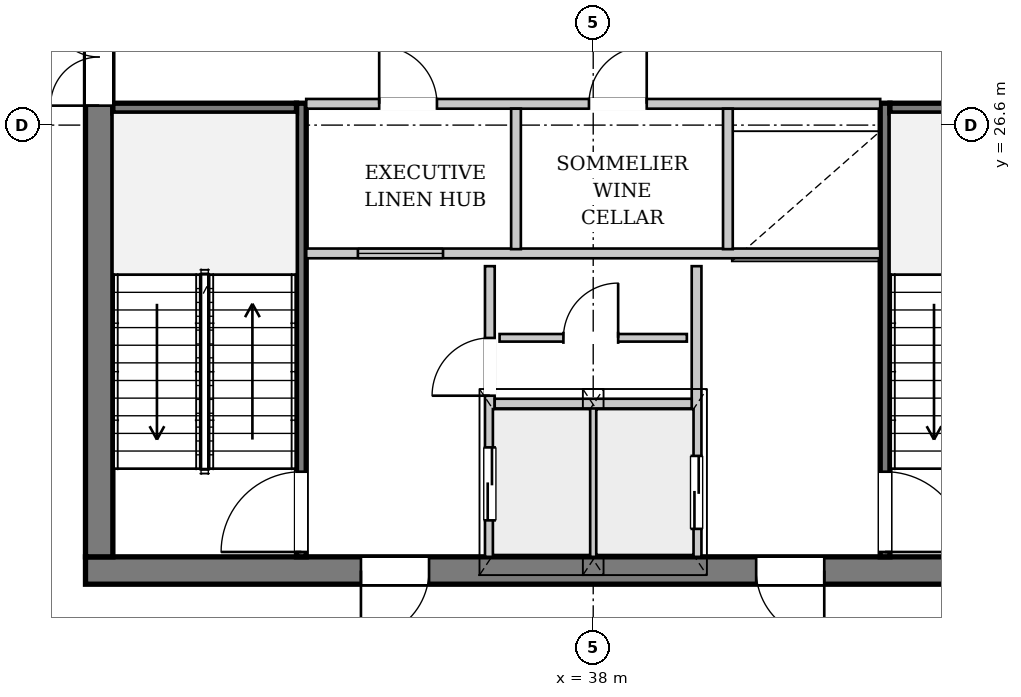
"""IFC4 building model, lengths in metres.
Left out: names, types, materials, properties, quantities, classifications, styles, units other than length and angle.
Written with IfcOpenShell. Run it as: python <this file> out.ifc"""

import sys

from ifc_helpers import new_model, si_unit, direction, frame, frame_2d, origin, place, context, subcontext, project, spatial, rectangle, extrude, source, transform, mapped, element, fill, save


model = new_model("IFC4")
c1 = context("Model", 3, precision=1e-05, world=origin(), true_north=direction((0.0, 1.0)))
c2 = subcontext(c1, "Body", "Model", "MODEL_VIEW")
j1 = project(units=[si_unit("LENGTHUNIT", "METRE"), si_unit("PLANEANGLEUNIT", "RADIAN")], contexts=[c1])
p1 = place(None, origin())
s1 = spatial("IfcSite", under=j1, at=p1, CompositionType="ELEMENT")
p2 = place(p1, origin())
s2 = spatial("IfcBuilding", under=s1, at=p2, CompositionType="ELEMENT")
p3 = place(p2, frame((0.0, 0.0, 277.7)))
s3 = spatial("IfcBuildingStorey", under=s2, at=p3, CompositionType="ELEMENT", Elevation=277.7)
p4 = place(p3, frame((30.073, 13.017, 0.0), z_axis=(0.0, 0.0, 1.0), x_axis=(-0.800180538876, 0.599759206018, 0.0)))
e1 = element("IfcWall", 1, at=p4, inside=s3, PredefinedType="SOLIDWALL", context=c2, shape_type="SweptSolid", body=[
    extrude(rectangle(XDim=17.198, YDim=0.32, at=frame_2d((8.599, 0.0))), origin(), (0.0, 0.0, 1.0), 3.462),
])
p5 = place(p4, frame((4.753, 0.0, 0.0)))
e2 = element("IfcOpeningElement", 2, at=p5, cuts=e1, PredefinedType="OPENING", context=c2, shape_type="SweptSolid", body=[
    extrude(rectangle(XDim=1.5, YDim=2.3, at=frame_2d((0.75, 1.15))), frame((0.0, 0.17, 0.0), z_axis=(0.0, -1.0, 0.0), x_axis=(1.0, 0.0, 0.0)), (0.0, 0.0, 1.0), 0.34),
])
p6 = place(p4, frame((11.426, 0.0, 0.65)))
e3 = element("IfcOpeningElement", 3, at=p6, cuts=e1, PredefinedType="OPENING", context=c2, shape_type="SweptSolid", body=[
    extrude(rectangle(XDim=2.6, YDim=2.35, at=frame_2d((1.3, 1.175))), frame((0.0, 0.17, 0.0), z_axis=(0.0, -1.0, 0.0), x_axis=(1.0, 0.0, 0.0)), (0.0, 0.0, 1.0), 0.34),
])
p7 = place(p3, frame((46.35, 19.275, 0.0), z_axis=(0.0, 0.0, 1.0), x_axis=(-1.0, 0.0, 0.0)))
e4 = element("IfcWall", 4, at=p7, inside=s3, PredefinedType="SHEAR", context=c2, shape_type="SweptSolid", body=[
    extrude(rectangle(XDim=16.7, YDim=0.45, at=frame_2d((8.35, 0.0))), origin(), (0.0, 0.0, 1.0), 3.92),
])
p8 = place(p7, frame((4.55, 0.0, 0.0)))
e5 = element("IfcOpeningElement", 5, at=p8, cuts=e4, PredefinedType="OPENING", context=c2, shape_type="SweptSolid", body=[
    extrude(rectangle(XDim=1.12, YDim=2.25, at=frame_2d((0.56, 1.125))), frame((0.0, 0.235, 0.0), z_axis=(0.0, -1.0, 0.0), x_axis=(1.0, 0.0, 0.0)), (0.0, 0.0, 1.0), 0.47),
])
p9 = place(p7, frame((11.05, 0.0, 0.0)))
e6 = element("IfcOpeningElement", 6, at=p9, cuts=e4, PredefinedType="OPENING", context=c2, shape_type="SweptSolid", body=[
    extrude(rectangle(XDim=1.12, YDim=2.25, at=frame_2d((0.56, 1.125))), frame((0.0, 0.235, 0.0), z_axis=(0.0, -1.0, 0.0), x_axis=(1.0, 0.0, 0.0)), (0.0, 0.0, 1.0), 0.47),
])
p10 = place(p3, frame((29.875, 19.5, 0.0), z_axis=(0.0, 0.0, 1.0), x_axis=(0.0, 1.0, 0.0)))
e7 = element("IfcWall", 7, at=p10, inside=s3, PredefinedType="SHEAR", context=c2, shape_type="SweptSolid", body=[
    extrude(rectangle(XDim=14.2, YDim=0.45, at=frame_2d((7.1, 0.0))), origin(), (0.0, 0.0, 1.0), 3.92),
])
p11 = place(p10, frame((7.42, 0.0, 0.0)))
e8 = element("IfcOpeningElement", 8, at=p11, cuts=e7, PredefinedType="OPENING", context=c2, shape_type="SweptSolid", body=[
    extrude(rectangle(XDim=1.6, YDim=2.2, at=frame_2d((0.8, 1.1))), frame((0.0, 0.235, 0.0), z_axis=(0.0, -1.0, 0.0), x_axis=(1.0, 0.0, 0.0)), (0.0, 0.0, 1.0), 0.47),
])
p12 = place(p3, frame((33.2, 19.5, 0.0), z_axis=(0.0, 0.0, 1.0), x_axis=(0.0, 1.0, 0.0)))
e9 = element("IfcWall", 9, at=p12, inside=s3, PredefinedType="PARTITIONING", context=c2, shape_type="SweptSolid", body=[
    extrude(rectangle(XDim=7.46, YDim=0.16, at=frame_2d((3.73, 0.0))), origin(), (0.0, 0.0, 1.0), 3.92),
])
p13 = place(p12, frame((0.08, 0.0, 0.0)))
e10 = element("IfcOpeningElement", 10, at=p13, cuts=e9, PredefinedType="OPENING", context=c2, shape_type="SweptSolid", body=[
    extrude(rectangle(XDim=1.32, YDim=2.2, at=frame_2d((0.66, 1.1))), frame((0.0, 0.09, 0.0), z_axis=(0.0, -1.0, 0.0), x_axis=(1.0, 0.0, 0.0)), (0.0, 0.0, 1.0), 0.18),
])
p14 = place(p3, frame((30.1, 26.88, 0.0), z_axis=(0.0, 0.0, 1.0), x_axis=(1.0, 0.0, 0.0)))
e11 = element("IfcWall", 11, at=p14, inside=s3, PredefinedType="PARTITIONING", context=c2, shape_type="SweptSolid", body=[
    extrude(rectangle(XDim=3.02, YDim=0.16, at=frame_2d((1.51, 0.0))), origin(), (0.0, 0.0, 1.0), 3.92),
])
p15 = place(p3, frame((42.8, 26.96, 0.0), z_axis=(0.0, 0.0, 1.0), x_axis=(0.0, -1.0, 0.0)))
e12 = element("IfcWall", 12, at=p15, inside=s3, PredefinedType="PARTITIONING", context=c2, shape_type="SweptSolid", body=[
    extrude(rectangle(XDim=7.46, YDim=0.16, at=frame_2d((3.73, 0.0))), origin(), (0.0, 0.0, 1.0), 3.92),
])
p16 = place(p15, frame((6.06, 0.0, 0.0)))
e13 = element("IfcOpeningElement", 13, at=p16, cuts=e12, PredefinedType="OPENING", context=c2, shape_type="SweptSolid", body=[
    extrude(rectangle(XDim=1.32, YDim=2.2, at=frame_2d((0.66, 1.1))), frame((0.0, 0.09, 0.0), z_axis=(0.0, -1.0, 0.0), x_axis=(1.0, 0.0, 0.0)), (0.0, 0.0, 1.0), 0.18),
])
p17 = place(p3, frame((42.88, 26.88, 0.0), z_axis=(0.0, 0.0, 1.0), x_axis=(1.0, 0.0, 0.0)))
e14 = element("IfcWall", 14, at=p17, inside=s3, PredefinedType="PARTITIONING", context=c2, shape_type="SweptSolid", body=[
    extrude(rectangle(XDim=3.02, YDim=0.16, at=frame_2d((1.51, 0.0))), origin(), (0.0, 0.0, 1.0), 3.92),
])
p18 = place(p3, frame((36.3, 19.5, 0.0), z_axis=(0.0, 0.0, 1.0), x_axis=(0.0, 1.0, 0.0)))
e15 = element("IfcWall", 15, at=p18, inside=s3, PredefinedType="PARTITIONING", context=c2, shape_type="SweptSolid", body=[
    extrude(rectangle(XDim=4.78, YDim=0.16, at=frame_2d((2.39, 0.0))), origin(), (0.0, 0.0, 1.0), 3.92),
])
p19 = place(p18, frame((0.6, 0.0, 0.0)))
e16 = element("IfcOpeningElement", 16, at=p19, cuts=e15, PredefinedType="OPENING", context=c2, shape_type="SweptSolid", body=[
    extrude(rectangle(XDim=1.2, YDim=2.2, at=frame_2d((0.6, 1.1))), frame((0.0, 0.09, 0.0), z_axis=(0.0, -1.0, 0.0), x_axis=(1.0, 0.0, 0.0)), (0.0, 0.0, 1.0), 0.18),
])
p20 = place(p18, frame((2.65, 0.0, 0.0)))
e17 = element("IfcOpeningElement", 17, at=p20, cuts=e15, PredefinedType="OPENING", context=c2, shape_type="SweptSolid", body=[
    extrude(rectangle(XDim=0.95, YDim=2.1, at=frame_2d((0.475, 1.05))), frame((0.0, 0.09, 0.0), z_axis=(0.0, -1.0, 0.0), x_axis=(1.0, 0.0, 0.0)), (0.0, 0.0, 1.0), 0.18),
])
p21 = place(p3, frame((39.7, 24.28, 0.0), z_axis=(0.0, 0.0, 1.0), x_axis=(0.0, -1.0, 0.0)))
e18 = element("IfcWall", 18, at=p21, inside=s3, PredefinedType="PARTITIONING", context=c2, shape_type="SweptSolid", body=[
    extrude(rectangle(XDim=4.78, YDim=0.16, at=frame_2d((2.39, 0.0))), origin(), (0.0, 0.0, 1.0), 3.92),
])
p22 = place(p21, frame((3.12, 0.0, 0.0)))
e19 = element("IfcOpeningElement", 19, at=p22, cuts=e18, PredefinedType="OPENING", context=c2, shape_type="SweptSolid", body=[
    extrude(rectangle(XDim=1.2, YDim=2.2, at=frame_2d((0.6, 1.1))), frame((0.0, 0.09, 0.0), z_axis=(0.0, -1.0, 0.0), x_axis=(1.0, 0.0, 0.0)), (0.0, 0.0, 1.0), 0.18),
])
p23 = place(p3, frame((38.0, 19.5, 0.0), z_axis=(0.0, 0.0, 1.0), x_axis=(0.0, 1.0, 0.0)))
e20 = element("IfcWall", 20, at=p23, inside=s3, PredefinedType="PARTITIONING", context=c2, shape_type="SweptSolid", body=[
    extrude(rectangle(XDim=2.46, YDim=0.125, at=frame_2d((1.23, 0.0))), origin(), (0.0, 0.0, 1.0), 3.92),
])
p24 = place(p3, frame((36.38, 22.02, 0.0), z_axis=(0.0, 0.0, 1.0), x_axis=(1.0, 0.0, 0.0)))
e21 = element("IfcWall", 21, at=p24, inside=s3, PredefinedType="PARTITIONING", context=c2, shape_type="SweptSolid", body=[
    extrude(rectangle(XDim=3.24, YDim=0.16, at=frame_2d((1.62, 0.0))), origin(), (0.0, 0.0, 1.0), 3.92),
])
p25 = place(p3, frame((33.28, 24.49, 0.0), z_axis=(0.0, 0.0, 1.0), x_axis=(1.0, 0.0, 0.0)))
e22 = element("IfcWall", 22, at=p25, inside=s3, PredefinedType="PARTITIONING", context=c2, shape_type="SweptSolid", body=[
    extrude(rectangle(XDim=9.44, YDim=0.16, at=frame_2d((4.72, 0.0))), origin(), (0.0, 0.0, 1.0), 3.92),
])
p26 = place(p25, frame((0.85, 0.0, 0.95)))
e23 = element("IfcOpeningElement", 23, at=p26, cuts=e22, PredefinedType="OPENING", context=c2, shape_type="SweptSolid", body=[
    extrude(rectangle(XDim=1.4, YDim=1.8, at=frame_2d((0.7, 0.9))), frame((0.0, 0.09, 0.0), z_axis=(0.0, -1.0, 0.0), x_axis=(1.0, 0.0, 0.0)), (0.0, 0.0, 1.0), 0.18),
])
p27 = place(p3, frame((36.46, 23.102, 0.0), z_axis=(0.0, 0.0, 1.0), x_axis=(1.0, 0.0, 0.0)))
e24 = element("IfcWall", 24, at=p27, inside=s3, PredefinedType="PARTITIONING", context=c2, shape_type="SweptSolid", body=[
    extrude(rectangle(XDim=3.08, YDim=0.125, at=frame_2d((1.54, 0.0))), origin(), (0.0, 0.0, 1.0), 3.92),
])
p28 = place(p27, frame((1.05, 0.0, 0.0)))
e25 = element("IfcOpeningElement", 25, at=p28, cuts=e24, PredefinedType="OPENING", context=c2, shape_type="SweptSolid", body=[
    extrude(rectangle(XDim=0.9, YDim=2.1, at=frame_2d((0.45, 1.05))), frame((0.0, 0.073, 0.0), z_axis=(0.0, -1.0, 0.0), x_axis=(1.0, 0.0, 0.0)), (0.0, 0.0, 1.0), 0.145),
])
p29 = place(p3, frame((33.28, 26.95, 0.0), z_axis=(0.0, 0.0, 1.0), x_axis=(1.0, 0.0, 0.0)))
e26 = element("IfcWall", 26, at=p29, inside=s3, PredefinedType="PARTITIONING", context=c2, shape_type="SweptSolid", body=[
    extrude(rectangle(XDim=9.44, YDim=0.16, at=frame_2d((4.72, 0.0))), origin(), (0.0, 0.0, 1.0), 3.92),
])
p30 = place(p29, frame((1.2, 0.0, 0.0)))
e27 = element("IfcOpeningElement", 27, at=p30, cuts=e26, PredefinedType="OPENING", context=c2, shape_type="SweptSolid", body=[
    extrude(rectangle(XDim=0.95, YDim=2.1, at=frame_2d((0.475, 1.05))), frame((0.0, 0.09, 0.0), z_axis=(0.0, -1.0, 0.0), x_axis=(1.0, 0.0, 0.0)), (0.0, 0.0, 1.0), 0.18),
])
p31 = place(p29, frame((4.65, 0.0, 0.0)))
e28 = element("IfcOpeningElement", 28, at=p31, cuts=e26, PredefinedType="OPENING", context=c2, shape_type="SweptSolid", body=[
    extrude(rectangle(XDim=0.95, YDim=2.1, at=frame_2d((0.475, 1.05))), frame((0.0, 0.09, 0.0), z_axis=(0.0, -1.0, 0.0), x_axis=(1.0, 0.0, 0.0)), (0.0, 0.0, 1.0), 0.18),
])
for number, where, z_axis, x_axis in (
    (29, (36.73, 24.56, 0.0), (0.0, 0.0, 1.0), (0.0, 1.0, 0.0)),
    (30, (40.215, 24.56, 0.0), (0.0, 0.0, 1.0), (0.0, 1.0, 0.0)),
):
    element("IfcWall", number, at=place(p3, frame(where, z_axis=z_axis, x_axis=x_axis)), inside=s3, PredefinedType="PARTITIONING", context=c2, shape_type="SweptSolid", body=[
        extrude(rectangle(XDim=2.31, YDim=0.16, at=frame_2d((1.155, 0.0))), origin(), (0.0, 0.0, 1.0), 3.92),
    ])
m1 = source(origin(), c2, "Body", "SweptSolid", [
    extrude(rectangle(XDim=1.12, YDim=2.25, at=frame_2d((0.56, 1.125))), frame((0.0, 0.025, 0.0), z_axis=(0.0, -1.0, 0.0), x_axis=(1.0, 0.0, 0.0)), (0.0, 0.0, 1.0), 0.05),
])
p32 = place(p8, origin())
e31 = element("IfcDoor", 31, at=p32, inside=s3, OperationType="SINGLE_SWING_LEFT", PredefinedType="DOOR", context=c2, shape_type="MappedRepresentation", body=[
    mapped(m1, transform((0.0, 0.0, 0.0), x_axis=(1.0, 0.0, 0.0), y_axis=(0.0, 1.0, 0.0), z_axis=(0.0, 0.0, 1.0), scale=1.0)),
])
fill(e5, e31)
p33 = place(p9, origin())
e32 = element("IfcDoor", 32, at=p33, inside=s3, OperationType="SINGLE_SWING_RIGHT", PredefinedType="DOOR", context=c2, shape_type="MappedRepresentation", body=[
    mapped(m1, transform((0.0, 0.0, 0.0), x_axis=(1.0, 0.0, 0.0), y_axis=(0.0, 1.0, 0.0), z_axis=(0.0, 0.0, 1.0), scale=1.0)),
])
fill(e6, e32)
m2 = source(origin(), c2, "Body", "SweptSolid", [
    extrude(rectangle(XDim=1.6, YDim=2.2, at=frame_2d((0.8, 1.1))), frame((0.0, 0.025, 0.0), z_axis=(0.0, -1.0, 0.0), x_axis=(1.0, 0.0, 0.0)), (0.0, 0.0, 1.0), 0.05),
])
p34 = place(p11, origin())
e33 = element("IfcDoor", 33, at=p34, inside=s3, OperationType="DOUBLE_DOOR_SINGLE_SWING", PredefinedType="DOOR", context=c2, shape_type="MappedRepresentation", body=[
    mapped(m2, transform((0.0, 0.0, 0.0), x_axis=(1.0, 0.0, 0.0), y_axis=(0.0, 1.0, 0.0), z_axis=(0.0, 0.0, 1.0), scale=1.0)),
])
fill(e8, e33)
m3 = source(origin(), c2, "Body", "SweptSolid", [
    extrude(rectangle(XDim=1.32, YDim=2.2, at=frame_2d((0.66, 1.1))), frame((0.0, 0.025, 0.0), z_axis=(0.0, -1.0, 0.0), x_axis=(1.0, 0.0, 0.0)), (0.0, 0.0, 1.0), 0.05),
])
p35 = place(p13, origin())
e34 = element("IfcDoor", 34, at=p35, inside=s3, OperationType="SINGLE_SWING_LEFT", PredefinedType="DOOR", context=c2, shape_type="MappedRepresentation", body=[
    mapped(m3, transform((0.0, 0.0, 0.0), x_axis=(1.0, 0.0, 0.0), y_axis=(0.0, 1.0, 0.0), z_axis=(0.0, 0.0, 1.0), scale=1.0)),
])
fill(e10, e34)
p36 = place(p16, origin())
e35 = element("IfcDoor", 35, at=p36, inside=s3, OperationType="SINGLE_SWING_RIGHT", PredefinedType="DOOR", context=c2, shape_type="MappedRepresentation", body=[
    mapped(m3, transform((0.0, 0.0, 0.0), x_axis=(1.0, 0.0, 0.0), y_axis=(0.0, 1.0, 0.0), z_axis=(0.0, 0.0, 1.0), scale=1.0)),
])
fill(e13, e35)
m4 = source(origin(), c2, "Body", "SweptSolid", [
    extrude(rectangle(XDim=1.2, YDim=2.2, at=frame_2d((0.6, 1.1))), frame((0.0, 0.025, 0.0), z_axis=(0.0, -1.0, 0.0), x_axis=(1.0, 0.0, 0.0)), (0.0, 0.0, 1.0), 0.05),
])
p37 = place(p19, origin())
e36 = element("IfcDoor", 36, at=p37, inside=s3, OperationType="DOUBLE_DOOR_SLIDING", PredefinedType="DOOR", context=c2, shape_type="MappedRepresentation", body=[
    mapped(m4, transform((0.0, 0.0, 0.0), x_axis=(1.0, 0.0, 0.0), y_axis=(0.0, 1.0, 0.0), z_axis=(0.0, 0.0, 1.0), scale=1.0)),
])
fill(e16, e36)
m5 = source(origin(), c2, "Body", "SweptSolid", [
    extrude(rectangle(XDim=0.95, YDim=2.1, at=frame_2d((0.475, 1.05))), frame((0.0, 0.025, 0.0), z_axis=(0.0, -1.0, 0.0), x_axis=(1.0, 0.0, 0.0)), (0.0, 0.0, 1.0), 0.05),
])
p38 = place(p20, origin())
e37 = element("IfcDoor", 37, at=p38, inside=s3, OperationType="SINGLE_SWING_LEFT", PredefinedType="DOOR", context=c2, shape_type="MappedRepresentation", body=[
    mapped(m5, transform((0.0, 0.0, 0.0), x_axis=(1.0, 0.0, 0.0), y_axis=(0.0, 1.0, 0.0), z_axis=(0.0, 0.0, 1.0), scale=1.0)),
])
fill(e17, e37)
m6 = source(origin(), c2, "Body", "SweptSolid", [
    extrude(rectangle(XDim=0.9, YDim=2.1, at=frame_2d((0.45, 1.05))), frame((0.0, 0.025, 0.0), z_axis=(0.0, -1.0, 0.0), x_axis=(1.0, 0.0, 0.0)), (0.0, 0.0, 1.0), 0.05),
])
p39 = place(p28, origin())
e38 = element("IfcDoor", 38, at=p39, inside=s3, OperationType="SINGLE_SWING_RIGHT", PredefinedType="DOOR", context=c2, shape_type="MappedRepresentation", body=[
    mapped(m6, transform((0.0, 0.0, 0.0), x_axis=(1.0, 0.0, 0.0), y_axis=(0.0, 1.0, 0.0), z_axis=(0.0, 0.0, 1.0), scale=1.0)),
])
fill(e25, e38)
p40 = place(p22, origin())
e39 = element("IfcDoor", 39, at=p40, inside=s3, OperationType="DOUBLE_DOOR_SLIDING", PredefinedType="DOOR", context=c2, shape_type="MappedRepresentation", body=[
    mapped(m4, transform((0.0, 0.0, 0.0), x_axis=(1.0, 0.0, 0.0), y_axis=(0.0, 1.0, 0.0), z_axis=(0.0, 0.0, 1.0), scale=1.0)),
])
fill(e19, e39)
p41 = place(p30, origin())
e40 = element("IfcDoor", 40, at=p41, inside=s3, OperationType="SINGLE_SWING_LEFT", PredefinedType="DOOR", context=c2, shape_type="MappedRepresentation", body=[
    mapped(m5, transform((0.0, 0.0, 0.0), x_axis=(1.0, 0.0, 0.0), y_axis=(0.0, 1.0, 0.0), z_axis=(0.0, 0.0, 1.0), scale=1.0)),
])
fill(e27, e40)
p42 = place(p31, origin())
e41 = element("IfcDoor", 41, at=p42, inside=s3, OperationType="SINGLE_SWING_RIGHT", PredefinedType="DOOR", context=c2, shape_type="MappedRepresentation", body=[
    mapped(m5, transform((0.0, 0.0, 0.0), x_axis=(1.0, 0.0, 0.0), y_axis=(0.0, 1.0, 0.0), z_axis=(0.0, 0.0, 1.0), scale=1.0)),
])
fill(e28, e41)
m7 = source(origin(), c2, "Body", "SweptSolid", [
    extrude(rectangle(XDim=1.4, YDim=1.8, at=frame_2d((0.7, 0.9))), frame((0.0, 0.03, 0.0), z_axis=(0.0, -1.0, 0.0), x_axis=(1.0, 0.0, 0.0)), (0.0, 0.0, 1.0), 0.06),
])
p43 = place(p26, origin())
e42 = element("IfcWindow", 42, at=p43, inside=s3, PartitioningType="SINGLE_PANEL", PredefinedType="WINDOW", context=c2, shape_type="MappedRepresentation", body=[
    mapped(m7, transform((0.0, 0.0, 0.0), x_axis=(1.0, 0.0, 0.0), y_axis=(0.0, 1.0, 0.0), z_axis=(0.0, 0.0, 1.0), scale=1.0)),
])
fill(e23, e42)
save(model, sys.argv[1])
